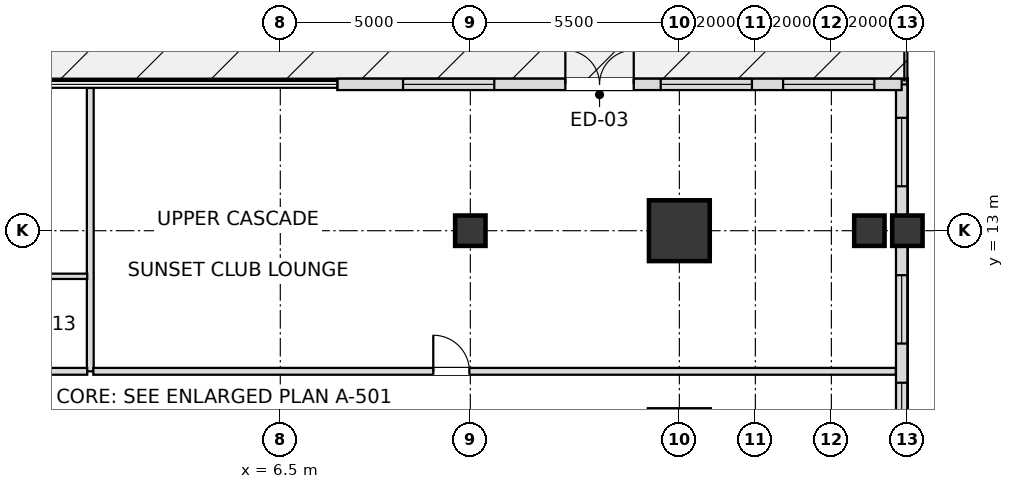
"""IFC4 building model, lengths in metres.
Left out: names, types, materials, properties, quantities, classifications, styles, units other than length and angle.
Written with IfcOpenShell. Run it as: python <this file> out.ifc"""

import sys

from ifc_helpers import new_model, si_unit, direction, frame, frame_2d, origin, origin_2d, place, context, subcontext, project, spatial, rectangle, extrude, element, fill, save


model = new_model("IFC4")
c1 = context("Model", 3, precision=1e-05, world=origin(), true_north=direction((0.0, 1.0)))
c2 = subcontext(c1, "Body", "Model", "MODEL_VIEW")
j1 = project(units=[si_unit("LENGTHUNIT", "METRE"), si_unit("PLANEANGLEUNIT", "RADIAN")], contexts=[c1])
p1 = place(None, origin())
s1 = spatial("IfcSite", under=j1, at=p1, CompositionType="ELEMENT")
p2 = place(p1, origin())
s2 = spatial("IfcBuilding", under=s1, at=p2, CompositionType="ELEMENT")
p3 = place(p2, frame((0.0, 0.0, 22.2)))
s3 = spatial("IfcBuildingStorey", under=s2, at=p3, CompositionType="ELEMENT", Elevation=22.2)
p4 = place(p3, frame((17.0, 13.0, 0.0), z_axis=(0.0, 0.0, 1.0), x_axis=(1.0, 0.0, 0.0)))
e1 = element("IfcColumn", 1, at=p4, inside=s3, PredefinedType="USERDEFINED", context=c2, shape_type="SweptSolid", body=[
    extrude(rectangle(XDim=1.6, YDim=1.6, at=origin_2d()), origin(), (0.0, 0.0, 1.0), 5.4),
])
for number, where, z_axis, x_axis in (
    (2, (23.0, 13.0, 0.0), (0.0, 0.0, 1.0), (1.0, 0.0, 0.0)),
    (3, (11.5, 13.0, 0.0), (0.0, 0.0, 1.0), (1.0, 0.0, 0.0)),
    (4, (22.0, 13.0, 0.0), (0.0, 0.0, 1.0), (1.0, 0.0, 0.0)),
):
    element("IfcColumn", number, at=place(p3, frame(where, z_axis=z_axis, x_axis=x_axis)), inside=s3, PredefinedType="COLUMN", context=c2, shape_type="SweptSolid", body=[
        extrude(rectangle(XDim=0.8, YDim=0.8, at=origin_2d()), origin(), (0.0, 0.0, 1.0), 5.4),
    ])
p5 = place(p3, frame((22.85, -16.85, 0.0), z_axis=(0.0, 0.0, 1.0), x_axis=(0.0, 1.0, 0.0)))
e5 = element("IfcWall", 5, at=p5, inside=s3, PredefinedType="SOLIDWALL", context=c2, shape_type="SweptSolid", body=[
    extrude(rectangle(XDim=33.7, YDim=0.3, at=frame_2d((16.85, 0.0))), origin(), (0.0, 0.0, 1.0), 2.985),
])
p6 = place(p5, frame((0.88, 0.0, 0.72)))
e6 = element("IfcOpeningElement", 6, at=p6, cuts=e5, PredefinedType="OPENING", context=c2, shape_type="SweptSolid", body=[
    extrude(rectangle(XDim=1.8, YDim=1.68, at=frame_2d((0.9, 0.84))), frame((0.0, 0.16, 0.0), z_axis=(0.0, -1.0, 0.0), x_axis=(1.0, 0.0, 0.0)), (0.0, 0.0, 1.0), 0.32),
])
p7 = place(p5, frame((5.39, 0.0, 0.72)))
e7 = element("IfcOpeningElement", 7, at=p7, cuts=e5, PredefinedType="OPENING", context=c2, shape_type="SweptSolid", body=[
    extrude(rectangle(XDim=1.8, YDim=1.68, at=frame_2d((0.9, 0.84))), frame((0.0, 0.16, 0.0), z_axis=(0.0, -1.0, 0.0), x_axis=(1.0, 0.0, 0.0)), (0.0, 0.0, 1.0), 0.32),
])
p8 = place(p5, frame((7.85, 0.0, 0.72)))
e8 = element("IfcOpeningElement", 8, at=p8, cuts=e5, PredefinedType="OPENING", context=c2, shape_type="SweptSolid", body=[
    extrude(rectangle(XDim=1.2, YDim=1.68, at=frame_2d((0.6, 0.84))), frame((0.0, 0.16, 0.0), z_axis=(0.0, -1.0, 0.0), x_axis=(1.0, 0.0, 0.0)), (0.0, 0.0, 1.0), 0.32),
])
p9 = place(p5, frame((11.205, 0.0, 0.72)))
e9 = element("IfcOpeningElement", 9, at=p9, cuts=e5, PredefinedType="OPENING", context=c2, shape_type="SweptSolid", body=[
    extrude(rectangle(XDim=1.8, YDim=1.68, at=frame_2d((0.9, 0.84))), frame((0.0, 0.16, 0.0), z_axis=(0.0, -1.0, 0.0), x_axis=(1.0, 0.0, 0.0)), (0.0, 0.0, 1.0), 0.32),
])
p10 = place(p5, frame((16.395, 0.0, 0.72)))
e10 = element("IfcOpeningElement", 10, at=p10, cuts=e5, PredefinedType="OPENING", context=c2, shape_type="SweptSolid", body=[
    extrude(rectangle(XDim=1.8, YDim=1.68, at=frame_2d((0.9, 0.84))), frame((0.0, 0.16, 0.0), z_axis=(0.0, -1.0, 0.0), x_axis=(1.0, 0.0, 0.0)), (0.0, 0.0, 1.0), 0.32),
])
p11 = place(p5, frame((21.3, 0.0, 0.72)))
e11 = element("IfcOpeningElement", 11, at=p11, cuts=e5, PredefinedType="OPENING", context=c2, shape_type="SweptSolid", body=[
    extrude(rectangle(XDim=1.8, YDim=1.68, at=frame_2d((0.9, 0.84))), frame((0.0, 0.16, 0.0), z_axis=(0.0, -1.0, 0.0), x_axis=(1.0, 0.0, 0.0)), (0.0, 0.0, 1.0), 0.32),
])
p12 = place(p5, frame((24.65, 0.0, 0.72)))
e12 = element("IfcOpeningElement", 12, at=p12, cuts=e5, PredefinedType="OPENING", context=c2, shape_type="SweptSolid", body=[
    extrude(rectangle(XDim=1.2, YDim=1.68, at=frame_2d((0.6, 0.84))), frame((0.0, 0.16, 0.0), z_axis=(0.0, -1.0, 0.0), x_axis=(1.0, 0.0, 0.0)), (0.0, 0.0, 1.0), 0.32),
])
p13 = place(p5, frame((26.88, 0.0, 0.72)))
e13 = element("IfcOpeningElement", 13, at=p13, cuts=e5, PredefinedType="OPENING", context=c2, shape_type="SweptSolid", body=[
    extrude(rectangle(XDim=1.8, YDim=1.68, at=frame_2d((0.9, 0.84))), frame((0.0, 0.16, 0.0), z_axis=(0.0, -1.0, 0.0), x_axis=(1.0, 0.0, 0.0)), (0.0, 0.0, 1.0), 0.32),
])
p14 = place(p5, frame((31.02, 0.0, 0.72)))
e14 = element("IfcOpeningElement", 14, at=p14, cuts=e5, PredefinedType="OPENING", context=c2, shape_type="SweptSolid", body=[
    extrude(rectangle(XDim=1.8, YDim=1.68, at=frame_2d((0.9, 0.84))), frame((0.0, 0.16, 0.0), z_axis=(0.0, -1.0, 0.0), x_axis=(1.0, 0.0, 0.0)), (0.0, 0.0, 1.0), 0.32),
])
p15 = place(p3, frame((8.0, 16.85, 0.0), z_axis=(0.0, 0.0, 1.0), x_axis=(1.0, 0.0, 0.0)))
e15 = element("IfcWall", 15, at=p15, inside=s3, PredefinedType="SOLIDWALL", context=c2, shape_type="SweptSolid", body=[
    extrude(rectangle(XDim=14.85, YDim=0.3, at=frame_2d((7.425, 0.0))), origin(), (0.0, 0.0, 1.0), 4.356),
])
p16 = place(p15, frame((6.0, 0.0, 0.0)))
e16 = element("IfcOpeningElement", 16, at=p16, cuts=e15, PredefinedType="OPENING", context=c2, shape_type="SweptSolid", body=[
    extrude(rectangle(XDim=1.8, YDim=2.3, at=frame_2d((0.9, 1.15))), frame((0.0, 0.16, 0.0), z_axis=(0.0, -1.0, 0.0), x_axis=(1.0, 0.0, 0.0)), (0.0, 0.0, 1.0), 0.32),
])
p17 = place(p15, frame((1.73, 0.0, 0.8)))
e17 = element("IfcOpeningElement", 17, at=p17, cuts=e15, PredefinedType="OPENING", context=c2, shape_type="SweptSolid", body=[
    extrude(rectangle(XDim=2.4, YDim=2.2, at=frame_2d((1.2, 1.1))), frame((0.0, 0.16, 0.0), z_axis=(0.0, -1.0, 0.0), x_axis=(1.0, 0.0, 0.0)), (0.0, 0.0, 1.0), 0.32),
])
p18 = place(p15, frame((8.51, 0.0, 0.8)))
e18 = element("IfcOpeningElement", 18, at=p18, cuts=e15, PredefinedType="OPENING", context=c2, shape_type="SweptSolid", body=[
    extrude(rectangle(XDim=2.4, YDim=2.2, at=frame_2d((1.2, 1.1))), frame((0.0, 0.16, 0.0), z_axis=(0.0, -1.0, 0.0), x_axis=(1.0, 0.0, 0.0)), (0.0, 0.0, 1.0), 0.32),
])
p19 = place(p15, frame((11.73, 0.0, 0.8)))
e19 = element("IfcOpeningElement", 19, at=p19, cuts=e15, PredefinedType="OPENING", context=c2, shape_type="SweptSolid", body=[
    extrude(rectangle(XDim=2.4, YDim=2.2, at=frame_2d((1.2, 1.1))), frame((0.0, 0.16, 0.0), z_axis=(0.0, -1.0, 0.0), x_axis=(1.0, 0.0, 0.0)), (0.0, 0.0, 1.0), 0.32),
])
p20 = place(p3, frame((1.5, 9.3, 0.0), z_axis=(0.0, 0.0, 1.0), x_axis=(0.0, 1.0, 0.0)))
e20 = element("IfcWall", 20, at=p20, inside=s3, PredefinedType="PARTITIONING", context=c2, shape_type="SweptSolid", body=[
    extrude(rectangle(XDim=7.455, YDim=0.18, at=frame_2d((3.728, 0.0))), origin(), (0.0, 0.0, 1.0), 4.568),
])
p21 = place(p3, frame((-0.37, 9.3, 0.0), z_axis=(0.0, 0.0, 1.0), x_axis=(1.0, 0.0, 0.0)))
e21 = element("IfcWall", 21, at=p21, inside=s3, PredefinedType="PARTITIONING", context=c2, shape_type="SweptSolid", body=[
    extrude(rectangle(XDim=1.79, YDim=0.18, at=frame_2d((0.895, 0.0))), origin(), (0.0, 0.0, 1.0), 5.0),
])
p22 = place(p3, frame((1.58, 9.3, 0.0), z_axis=(0.0, 0.0, 1.0), x_axis=(1.0, 0.0, 0.0)))
e22 = element("IfcWall", 22, at=p22, inside=s3, PredefinedType="PARTITIONING", context=c2, shape_type="SweptSolid", body=[
    extrude(rectangle(XDim=21.115, YDim=0.18, at=frame_2d((10.558, 0.0))), origin(), (0.0, 0.0, 1.0), 4.356),
])
p23 = place(p22, frame((8.945, 0.0, 0.0)))
e23 = element("IfcOpeningElement", 23, at=p23, cuts=e22, PredefinedType="OPENING", context=c2, shape_type="SweptSolid", body=[
    extrude(rectangle(XDim=0.95, YDim=2.15, at=frame_2d((0.475, 1.075))), frame((0.0, 0.1, 0.0), z_axis=(0.0, -1.0, 0.0), x_axis=(1.0, 0.0, 0.0)), (0.0, 0.0, 1.0), 0.2),
])
p24 = place(p3, frame((-0.37, 11.8, 0.0), z_axis=(0.0, 0.0, 1.0), x_axis=(1.0, 0.0, 0.0)))
e24 = element("IfcWall", 24, at=p24, inside=s3, PredefinedType="PARTITIONING", context=c2, shape_type="SweptSolid", body=[
    extrude(rectangle(XDim=1.79, YDim=0.14, at=frame_2d((0.895, 0.0))), origin(), (0.0, 0.0, 1.0), 5.0),
])
p25 = place(p12, origin())
e25 = element("IfcWindow", 25, at=p25, inside=s3, PartitioningType="SINGLE_PANEL", PredefinedType="WINDOW", context=c2, shape_type="SweptSolid", body=[
    extrude(rectangle(XDim=1.2, YDim=1.68, at=frame_2d((0.6, 0.84))), frame((0.0, 0.03, 0.0), z_axis=(0.0, -1.0, 0.0), x_axis=(1.0, 0.0, 0.0)), (0.0, 0.0, 1.0), 0.06),
])
fill(e12, e25)
p26 = place(p13, origin())
e26 = element("IfcWindow", 26, at=p26, inside=s3, PartitioningType="SINGLE_PANEL", PredefinedType="WINDOW", context=c2, shape_type="SweptSolid", body=[
    extrude(rectangle(XDim=1.8, YDim=1.68, at=frame_2d((0.9, 0.84))), frame((0.0, 0.03, 0.0), z_axis=(0.0, -1.0, 0.0), x_axis=(1.0, 0.0, 0.0)), (0.0, 0.0, 1.0), 0.06),
])
fill(e13, e26)
p27 = place(p14, origin())
e27 = element("IfcWindow", 27, at=p27, inside=s3, PartitioningType="SINGLE_PANEL", PredefinedType="WINDOW", context=c2, shape_type="SweptSolid", body=[
    extrude(rectangle(XDim=1.8, YDim=1.68, at=frame_2d((0.9, 0.84))), frame((0.0, 0.03, 0.0), z_axis=(0.0, -1.0, 0.0), x_axis=(1.0, 0.0, 0.0)), (0.0, 0.0, 1.0), 0.06),
])
fill(e14, e27)
p28 = place(p16, origin())
e28 = element("IfcDoor", 28, at=p28, inside=s3, OperationType="DOUBLE_DOOR_SINGLE_SWING", PredefinedType="DOOR", context=c2, shape_type="SweptSolid", body=[
    extrude(rectangle(XDim=1.8, YDim=2.3, at=frame_2d((0.9, 1.15))), frame((0.0, 0.025, 0.0), z_axis=(0.0, -1.0, 0.0), x_axis=(1.0, 0.0, 0.0)), (0.0, 0.0, 1.0), 0.05),
])
fill(e16, e28)
p29 = place(p17, origin())
e29 = element("IfcWindow", 29, at=p29, inside=s3, PartitioningType="SINGLE_PANEL", PredefinedType="WINDOW", context=c2, shape_type="SweptSolid", body=[
    extrude(rectangle(XDim=2.4, YDim=2.2, at=frame_2d((1.2, 1.1))), frame((0.0, 0.03, 0.0), z_axis=(0.0, -1.0, 0.0), x_axis=(1.0, 0.0, 0.0)), (0.0, 0.0, 1.0), 0.06),
])
fill(e17, e29)
p30 = place(p18, origin())
e30 = element("IfcWindow", 30, at=p30, inside=s3, PartitioningType="SINGLE_PANEL", PredefinedType="WINDOW", context=c2, shape_type="SweptSolid", body=[
    extrude(rectangle(XDim=2.4, YDim=2.2, at=frame_2d((1.2, 1.1))), frame((0.0, 0.03, 0.0), z_axis=(0.0, -1.0, 0.0), x_axis=(1.0, 0.0, 0.0)), (0.0, 0.0, 1.0), 0.06),
])
fill(e18, e30)
p31 = place(p19, origin())
e31 = element("IfcWindow", 31, at=p31, inside=s3, PartitioningType="SINGLE_PANEL", PredefinedType="WINDOW", context=c2, shape_type="SweptSolid", body=[
    extrude(rectangle(XDim=2.4, YDim=2.2, at=frame_2d((1.2, 1.1))), frame((0.0, 0.03, 0.0), z_axis=(0.0, -1.0, 0.0), x_axis=(1.0, 0.0, 0.0)), (0.0, 0.0, 1.0), 0.06),
])
fill(e19, e31)
p32 = place(p23, origin())
e32 = element("IfcDoor", 32, at=p32, inside=s3, OperationType="SINGLE_SWING_LEFT", PredefinedType="DOOR", context=c2, shape_type="SweptSolid", body=[
    extrude(rectangle(XDim=0.95, YDim=2.15, at=frame_2d((0.475, 1.075))), frame((0.0, 0.025, 0.0), z_axis=(0.0, -1.0, 0.0), x_axis=(1.0, 0.0, 0.0)), (0.0, 0.0, 1.0), 0.05),
])
fill(e23, e32)
save(model, sys.argv[1])
